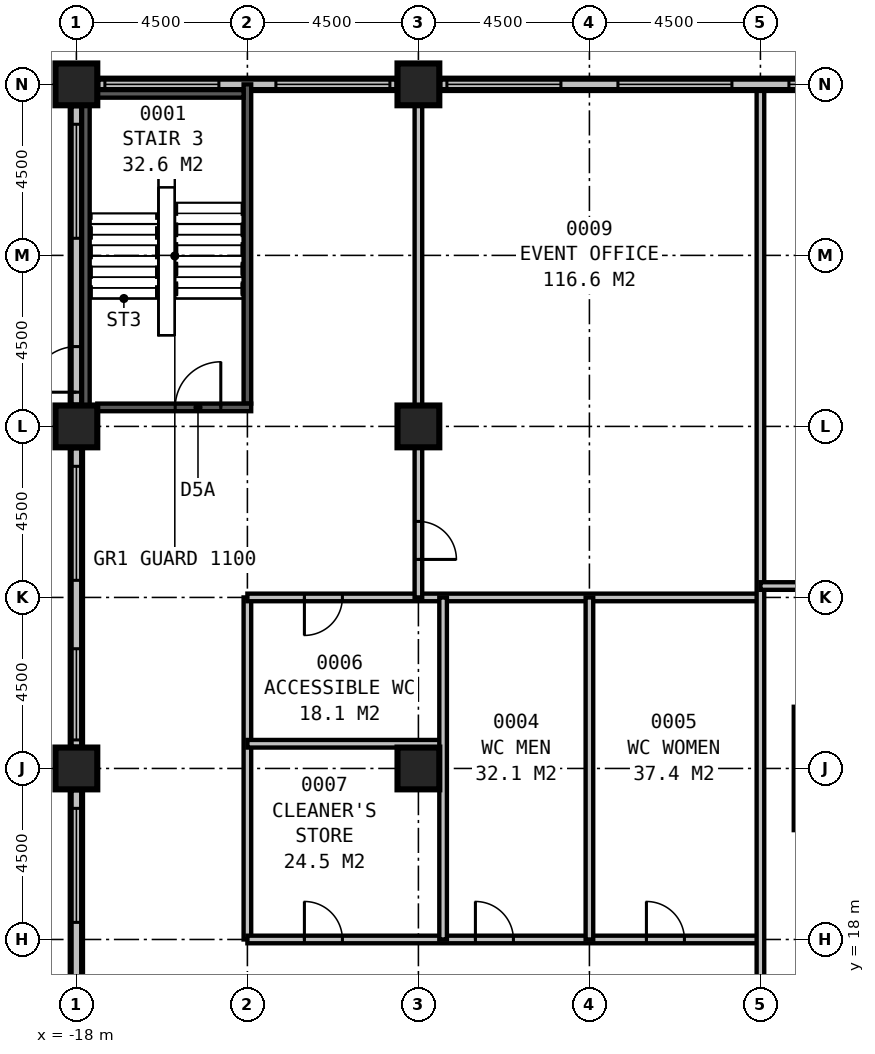
"""IFC4 building model, lengths in metres.
Left out: names, types, materials, properties, quantities, classifications, styles, units other than length and angle.
Written with IfcOpenShell. Run it as: python <this file> out.ifc"""

import sys

from ifc_helpers import new_model, si_unit, direction, frame, frame_2d, origin, origin_2d, place, context, subcontext, project, spatial, rectangle, extrude, element, fill, save


model = new_model("IFC4")
c1 = context("Model", 3, precision=1e-05, world=origin(), true_north=direction((0.0, 1.0)))
c2 = subcontext(c1, "Body", "Model", "MODEL_VIEW")
j1 = project(units=[si_unit("LENGTHUNIT", "METRE"), si_unit("PLANEANGLEUNIT", "RADIAN")], contexts=[c1])
p1 = place(None, origin())
s1 = spatial("IfcSite", under=j1, at=p1, CompositionType="ELEMENT")
p2 = place(p1, origin())
s2 = spatial("IfcBuilding", under=s1, at=p2, CompositionType="ELEMENT")
p3 = place(p2, origin())
s3 = spatial("IfcBuildingStorey", under=s2, at=p3, CompositionType="ELEMENT", Elevation=0.0)
for number, where, z_axis, x_axis in (
    (1, (-18.0, 22.5, 0.0), (0.0, 0.0, 1.0), (1.0, 0.0, 0.0)),
    (2, (-9.0, 22.5, 0.0), (0.0, 0.0, 1.0), (1.0, 0.0, 0.0)),
    (3, (-18.0, 31.5, 0.0), (0.0, 0.0, 1.0), (1.0, 0.0, 0.0)),
    (4, (-9.0, 31.5, 0.0), (0.0, 0.0, 1.0), (1.0, 0.0, 0.0)),
    (5, (-18.0, 40.5, 0.0), (0.0, 0.0, 1.0), (1.0, 0.0, 0.0)),
    (6, (-9.0, 40.5, 0.0), (0.0, 0.0, 1.0), (1.0, 0.0, 0.0)),
):
    element("IfcColumn", number, at=place(p3, frame(where, z_axis=z_axis, x_axis=x_axis)), inside=s3, PredefinedType="COLUMN", context=c2, shape_type="SweptSolid", body=[
        extrude(rectangle(XDim=1.1, YDim=1.1, at=origin_2d()), origin(), (0.0, 0.0, 1.0), 6.0),
    ])
p4 = place(p3, frame((3.95, 40.5, 0.0), z_axis=(0.0, 0.0, 1.0), x_axis=(-1.0, 0.0, 0.0)))
e7 = element("IfcWall", 7, at=p4, inside=s3, PredefinedType="STANDARD", context=c2, shape_type="SweptSolid", body=[
    extrude(rectangle(XDim=12.4, YDim=0.3, at=frame_2d((6.2, 0.0))), origin(), (0.0, 0.0, 1.0), 4.0),
])
p5 = place(p4, frame((0.2, 0.0, 0.5)))
e8 = element("IfcOpeningElement", 8, at=p5, cuts=e7, PredefinedType="OPENING", context=c2, shape_type="SweptSolid", body=[
    extrude(rectangle(XDim=3.0, YDim=3.0, at=frame_2d((1.5, 1.5))), frame((0.0, 0.16, 0.0), z_axis=(0.0, -1.0, 0.0), x_axis=(1.0, 0.0, 0.0)), (0.0, 0.0, 1.0), 0.32),
])
p6 = place(p4, frame((4.7, 0.0, 0.5)))
e9 = element("IfcOpeningElement", 9, at=p6, cuts=e7, PredefinedType="OPENING", context=c2, shape_type="SweptSolid", body=[
    extrude(rectangle(XDim=3.0, YDim=3.0, at=frame_2d((1.5, 1.5))), frame((0.0, 0.16, 0.0), z_axis=(0.0, -1.0, 0.0), x_axis=(1.0, 0.0, 0.0)), (0.0, 0.0, 1.0), 0.32),
])
p7 = place(p4, frame((9.2, 0.0, 0.5)))
e10 = element("IfcOpeningElement", 10, at=p7, cuts=e7, PredefinedType="OPENING", context=c2, shape_type="SweptSolid", body=[
    extrude(rectangle(XDim=3.0, YDim=3.0, at=frame_2d((1.5, 1.5))), frame((0.0, 0.16, 0.0), z_axis=(0.0, -1.0, 0.0), x_axis=(1.0, 0.0, 0.0)), (0.0, 0.0, 1.0), 0.32),
])
p8 = place(p3, frame((-9.55, 40.5, 0.0), z_axis=(0.0, 0.0, 1.0), x_axis=(-1.0, 0.0, 0.0)))
e11 = element("IfcWall", 11, at=p8, inside=s3, PredefinedType="STANDARD", context=c2, shape_type="SweptSolid", body=[
    extrude(rectangle(XDim=7.9, YDim=0.3, at=frame_2d((3.95, 0.0))), origin(), (0.0, 0.0, 1.0), 4.8),
])
p9 = place(p8, frame((0.2, 0.0, 0.5)))
e12 = element("IfcOpeningElement", 12, at=p9, cuts=e11, PredefinedType="OPENING", context=c2, shape_type="SweptSolid", body=[
    extrude(rectangle(XDim=3.0, YDim=3.0, at=frame_2d((1.5, 1.5))), frame((0.0, 0.16, 0.0), z_axis=(0.0, -1.0, 0.0), x_axis=(1.0, 0.0, 0.0)), (0.0, 0.0, 1.0), 0.32),
])
p10 = place(p8, frame((4.7, 0.0, 0.5)))
e13 = element("IfcOpeningElement", 13, at=p10, cuts=e11, PredefinedType="OPENING", context=c2, shape_type="SweptSolid", body=[
    extrude(rectangle(XDim=3.0, YDim=3.0, at=frame_2d((1.5, 1.5))), frame((0.0, 0.16, 0.0), z_axis=(0.0, -1.0, 0.0), x_axis=(1.0, 0.0, 0.0)), (0.0, 0.0, 1.0), 0.32),
])
p11 = place(p3, frame((-18.0, 39.95, 0.0), z_axis=(0.0, 0.0, 1.0), x_axis=(0.0, -1.0, 0.0)))
e14 = element("IfcWall", 14, at=p11, inside=s3, PredefinedType="STANDARD", context=c2, shape_type="SweptSolid", body=[
    extrude(rectangle(XDim=7.9, YDim=0.3, at=frame_2d((3.95, 0.0))), origin(), (0.0, 0.0, 1.0), 4.8),
])
p12 = place(p11, frame((7.55, 0.0, 0.0), z_axis=(0.0, 0.0, 1.0), x_axis=(-1.0, 0.0, 0.0)))
e15 = element("IfcOpeningElement", 15, at=p12, cuts=e14, PredefinedType="OPENING", context=c2, shape_type="SweptSolid", body=[
    extrude(rectangle(XDim=1.2, YDim=2.4, at=frame_2d((0.6, 1.2))), frame((0.0, 0.16, 0.0), z_axis=(0.0, -1.0, 0.0), x_axis=(1.0, 0.0, 0.0)), (0.0, 0.0, 1.0), 0.32),
])
p13 = place(p11, frame((0.5, 0.0, 0.5)))
e16 = element("IfcOpeningElement", 16, at=p13, cuts=e14, PredefinedType="OPENING", context=c2, shape_type="SweptSolid", body=[
    extrude(rectangle(XDim=3.0, YDim=3.0, at=frame_2d((1.5, 1.5))), frame((0.0, 0.16, 0.0), z_axis=(0.0, -1.0, 0.0), x_axis=(1.0, 0.0, 0.0)), (0.0, 0.0, 1.0), 0.32),
])
p14 = place(p3, frame((-18.0, 30.95, 0.0), z_axis=(0.0, 0.0, 1.0), x_axis=(0.0, -1.0, 0.0)))
e17 = element("IfcWall", 17, at=p14, inside=s3, PredefinedType="STANDARD", context=c2, shape_type="SweptSolid", body=[
    extrude(rectangle(XDim=7.9, YDim=0.3, at=frame_2d((3.95, 0.0))), origin(), (0.0, 0.0, 1.0), 4.1),
])
p15 = place(p14, frame((0.5, 0.0, 0.5)))
e18 = element("IfcOpeningElement", 18, at=p15, cuts=e17, PredefinedType="OPENING", context=c2, shape_type="SweptSolid", body=[
    extrude(rectangle(XDim=3.0, YDim=3.0, at=frame_2d((1.5, 1.5))), frame((0.0, 0.16, 0.0), z_axis=(0.0, -1.0, 0.0), x_axis=(1.0, 0.0, 0.0)), (0.0, 0.0, 1.0), 0.32),
])
p16 = place(p14, frame((5.3, 0.0, 0.5)))
e19 = element("IfcOpeningElement", 19, at=p16, cuts=e17, PredefinedType="OPENING", context=c2, shape_type="SweptSolid", body=[
    extrude(rectangle(XDim=2.4, YDim=3.0, at=frame_2d((1.2, 1.5))), frame((0.0, 0.16, 0.0), z_axis=(0.0, -1.0, 0.0), x_axis=(1.0, 0.0, 0.0)), (0.0, 0.0, 1.0), 0.32),
])
p17 = place(p3, frame((-18.0, 21.95, 0.0), z_axis=(0.0, 0.0, 1.0), x_axis=(0.0, -1.0, 0.0)))
e20 = element("IfcWall", 20, at=p17, inside=s3, PredefinedType="STANDARD", context=c2, shape_type="SweptSolid", body=[
    extrude(rectangle(XDim=7.9, YDim=0.3, at=frame_2d((3.95, 0.0))), origin(), (0.0, 0.0, 1.0), 4.1),
])
p18 = place(p17, frame((0.5, 0.0, 0.5)))
e21 = element("IfcOpeningElement", 21, at=p18, cuts=e20, PredefinedType="OPENING", context=c2, shape_type="SweptSolid", body=[
    extrude(rectangle(XDim=3.0, YDim=3.0, at=frame_2d((1.5, 1.5))), frame((0.0, 0.16, 0.0), z_axis=(0.0, -1.0, 0.0), x_axis=(1.0, 0.0, 0.0)), (0.0, 0.0, 1.0), 0.32),
])
p19 = place(p17, frame((5.3, 0.0, 0.5)))
e22 = element("IfcOpeningElement", 22, at=p19, cuts=e20, PredefinedType="OPENING", context=c2, shape_type="SweptSolid", body=[
    extrude(rectangle(XDim=2.4, YDim=3.0, at=frame_2d((1.2, 1.5))), frame((0.0, 0.16, 0.0), z_axis=(0.0, -1.0, 0.0), x_axis=(1.0, 0.0, 0.0)), (0.0, 0.0, 1.0), 0.32),
])
p20 = place(p3, frame((-17.45, 32.0, 0.0), z_axis=(0.0, 0.0, 1.0), x_axis=(1.0, 0.0, 0.0)))
e23 = element("IfcWall", 23, at=p20, inside=s3, PredefinedType="SOLIDWALL", context=c2, shape_type="SweptSolid", body=[
    extrude(rectangle(XDim=4.05, YDim=0.2, at=frame_2d((2.025, 0.0))), origin(), (0.0, 0.0, 1.0), 4.1),
])
p21 = place(p20, frame((2.05, 0.0, 0.0)))
e24 = element("IfcOpeningElement", 24, at=p21, cuts=e23, PredefinedType="OPENING", context=c2, shape_type="SweptSolid", body=[
    extrude(rectangle(XDim=1.2, YDim=2.1, at=frame_2d((0.6, 1.05))), frame((0.0, 0.11, 0.0), z_axis=(0.0, -1.0, 0.0), x_axis=(1.0, 0.0, 0.0)), (0.0, 0.0, 1.0), 0.22),
])
p22 = place(p3, frame((-13.5, 32.1, 0.0), z_axis=(0.0, 0.0, 1.0), x_axis=(0.0, 1.0, 0.0)))
e25 = element("IfcWall", 25, at=p22, inside=s3, PredefinedType="SOLIDWALL", context=c2, shape_type="SweptSolid", body=[
    extrude(rectangle(XDim=8.4, YDim=0.2, at=frame_2d((4.2, 0.0))), origin(), (0.0, 0.0, 1.0), 5.7),
])
p23 = place(p3, frame((-17.75, 32.05, 0.0), z_axis=(0.0, 0.0, 1.0), x_axis=(0.0, 1.0, 0.0)))
e26 = element("IfcWall", 26, at=p23, inside=s3, PredefinedType="SOLIDWALL", context=c2, shape_type="SweptSolid", body=[
    extrude(rectangle(XDim=7.9, YDim=0.2, at=frame_2d((3.95, 0.0))), origin(), (0.0, 0.0, 1.0), 5.7),
])
p24 = place(p23, frame((0.35, 0.0, 0.0)))
e27 = element("IfcOpeningElement", 27, at=p24, cuts=e26, PredefinedType="OPENING", context=c2, shape_type="SweptSolid", body=[
    extrude(rectangle(XDim=1.2, YDim=2.4, at=frame_2d((0.6, 1.2))), frame((0.0, 0.11, 0.0), z_axis=(0.0, -1.0, 0.0), x_axis=(1.0, 0.0, 0.0)), (0.0, 0.0, 1.0), 0.22),
])
p25 = place(p23, frame((4.4, 0.0, 0.5)))
e28 = element("IfcOpeningElement", 28, at=p25, cuts=e26, PredefinedType="OPENING", context=c2, shape_type="SweptSolid", body=[
    extrude(rectangle(XDim=3.0, YDim=3.0, at=frame_2d((1.5, 1.5))), frame((0.0, 0.11, 0.0), z_axis=(0.0, -1.0, 0.0), x_axis=(1.0, 0.0, 0.0)), (0.0, 0.0, 1.0), 0.22),
])
p26 = place(p3, frame((-17.45, 40.25, 0.0), z_axis=(0.0, 0.0, 1.0), x_axis=(1.0, 0.0, 0.0)))
e29 = element("IfcWall", 29, at=p26, inside=s3, PredefinedType="SOLIDWALL", context=c2, shape_type="SweptSolid", body=[
    extrude(rectangle(XDim=3.85, YDim=0.2, at=frame_2d((1.925, 0.0))), origin(), (0.0, 0.0, 1.0), 5.7),
])
p27 = place(p26, frame((0.2, 0.0, 0.5)))
e30 = element("IfcOpeningElement", 30, at=p27, cuts=e29, PredefinedType="OPENING", context=c2, shape_type="SweptSolid", body=[
    extrude(rectangle(XDim=3.0, YDim=3.0, at=frame_2d((1.5, 1.5))), frame((0.0, 0.11, 0.0), z_axis=(0.0, -1.0, 0.0), x_axis=(1.0, 0.0, 0.0)), (0.0, 0.0, 1.0), 0.22),
])
p28 = place(p3, frame((0.0, 10.4, 0.0), z_axis=(0.0, 0.0, 1.0), x_axis=(0.0, 1.0, 0.0)))
e31 = element("IfcWall", 31, at=p28, inside=s3, PredefinedType="PARTITIONING", context=c2, shape_type="SweptSolid", body=[
    extrude(rectangle(XDim=30.1, YDim=0.2, at=frame_2d((15.05, 0.0))), origin(), (0.0, 0.0, 1.0), 5.7),
])
p29 = place(p28, frame((0.2, 0.0, 0.0)))
e32 = element("IfcOpeningElement", 32, at=p29, cuts=e31, PredefinedType="OPENING", context=c2, shape_type="SweptSolid", body=[
    extrude(rectangle(XDim=1.2, YDim=2.1, at=frame_2d((0.6, 1.05))), frame((0.0, 0.11, 0.0), z_axis=(0.0, -1.0, 0.0), x_axis=(1.0, 0.0, 0.0)), (0.0, 0.0, 1.0), 0.22),
])
p30 = place(p3, frame((-13.5, 18.0, 0.0), z_axis=(0.0, 0.0, 1.0), x_axis=(1.0, 0.0, 0.0)))
e33 = element("IfcWall", 33, at=p30, inside=s3, PredefinedType="PARTITIONING", context=c2, shape_type="SweptSolid", body=[
    extrude(rectangle(XDim=13.5, YDim=0.2, at=frame_2d((6.75, 0.0))), origin(), (0.0, 0.0, 1.0), 5.7),
])
p31 = place(p30, frame((6.0, 0.0, 0.0)))
e34 = element("IfcOpeningElement", 34, at=p31, cuts=e33, PredefinedType="OPENING", context=c2, shape_type="SweptSolid", body=[
    extrude(rectangle(XDim=1.0, YDim=2.1, at=frame_2d((0.5, 1.05))), frame((0.0, 0.11, 0.0), z_axis=(0.0, -1.0, 0.0), x_axis=(1.0, 0.0, 0.0)), (0.0, 0.0, 1.0), 0.22),
])
p32 = place(p30, frame((10.5, 0.0, 0.0)))
e35 = element("IfcOpeningElement", 35, at=p32, cuts=e33, PredefinedType="OPENING", context=c2, shape_type="SweptSolid", body=[
    extrude(rectangle(XDim=1.0, YDim=2.1, at=frame_2d((0.5, 1.05))), frame((0.0, 0.11, 0.0), z_axis=(0.0, -1.0, 0.0), x_axis=(1.0, 0.0, 0.0)), (0.0, 0.0, 1.0), 0.22),
])
p33 = place(p30, frame((1.5, 0.0, 0.0)))
e36 = element("IfcOpeningElement", 36, at=p33, cuts=e33, PredefinedType="OPENING", context=c2, shape_type="SweptSolid", body=[
    extrude(rectangle(XDim=1.0, YDim=2.1, at=frame_2d((0.5, 1.05))), frame((0.0, 0.11, 0.0), z_axis=(0.0, -1.0, 0.0), x_axis=(1.0, 0.0, 0.0)), (0.0, 0.0, 1.0), 0.22),
])
p34 = place(p3, frame((-13.5, 18.0, 0.0), z_axis=(0.0, 0.0, 1.0), x_axis=(0.0, 1.0, 0.0)))
e37 = element("IfcWall", 37, at=p34, inside=s3, PredefinedType="PARTITIONING", context=c2, shape_type="SweptSolid", body=[
    extrude(rectangle(XDim=9.0, YDim=0.2, at=frame_2d((4.5, 0.0))), origin(), (0.0, 0.0, 1.0), 5.7),
])
p35 = place(p3, frame((-13.5, 27.0, 0.0), z_axis=(0.0, 0.0, 1.0), x_axis=(1.0, 0.0, 0.0)))
e38 = element("IfcWall", 38, at=p35, inside=s3, PredefinedType="PARTITIONING", context=c2, shape_type="SweptSolid", body=[
    extrude(rectangle(XDim=13.5, YDim=0.2, at=frame_2d((6.75, 0.0))), origin(), (0.0, 0.0, 1.0), 5.7),
])
p36 = place(p35, frame((2.5, 0.0, 0.0), z_axis=(0.0, 0.0, 1.0), x_axis=(-1.0, 0.0, 0.0)))
e39 = element("IfcOpeningElement", 39, at=p36, cuts=e38, PredefinedType="OPENING", context=c2, shape_type="SweptSolid", body=[
    extrude(rectangle(XDim=1.0, YDim=2.1, at=frame_2d((0.5, 1.05))), frame((0.0, 0.11, 0.0), z_axis=(0.0, -1.0, 0.0), x_axis=(1.0, 0.0, 0.0)), (0.0, 0.0, 1.0), 0.22),
])
p37 = place(p3, frame((-4.5, 18.0, 0.0), z_axis=(0.0, 0.0, 1.0), x_axis=(0.0, 1.0, 0.0)))
e40 = element("IfcWall", 40, at=p37, inside=s3, PredefinedType="PARTITIONING", context=c2, shape_type="SweptSolid", body=[
    extrude(rectangle(XDim=9.0, YDim=0.2, at=frame_2d((4.5, 0.0))), origin(), (0.0, 0.0, 1.0), 5.7),
])
p38 = place(p3, frame((-13.5, 23.15, 0.0), z_axis=(0.0, 0.0, 1.0), x_axis=(1.0, 0.0, 0.0)))
e41 = element("IfcWall", 41, at=p38, inside=s3, PredefinedType="PARTITIONING", context=c2, shape_type="SweptSolid", body=[
    extrude(rectangle(XDim=5.15, YDim=0.2, at=frame_2d((2.575, 0.0))), origin(), (0.0, 0.0, 1.0), 5.7),
])
p39 = place(p3, frame((-8.35, 18.0, 0.0), z_axis=(0.0, 0.0, 1.0), x_axis=(0.0, 1.0, 0.0)))
e42 = element("IfcWall", 42, at=p39, inside=s3, PredefinedType="PARTITIONING", context=c2, shape_type="SweptSolid", body=[
    extrude(rectangle(XDim=9.0, YDim=0.2, at=frame_2d((4.5, 0.0))), origin(), (0.0, 0.0, 1.0), 5.7),
])
p40 = place(p3, frame((-9.0, 27.0, 0.0), z_axis=(0.0, 0.0, 1.0), x_axis=(0.0, 1.0, 0.0)))
e43 = element("IfcWall", 43, at=p40, inside=s3, PredefinedType="PARTITIONING", context=c2, shape_type="SweptSolid", body=[
    extrude(rectangle(XDim=3.95, YDim=0.2, at=frame_2d((1.975, 0.0))), origin(), (0.0, 0.0, 1.0), 4.1),
])
p41 = place(p40, frame((2.0, 0.0, 0.0), z_axis=(0.0, 0.0, 1.0), x_axis=(-1.0, 0.0, 0.0)))
e44 = element("IfcOpeningElement", 44, at=p41, cuts=e43, PredefinedType="OPENING", context=c2, shape_type="SweptSolid", body=[
    extrude(rectangle(XDim=1.0, YDim=2.1, at=frame_2d((0.5, 1.05))), frame((0.0, 0.11, 0.0), z_axis=(0.0, -1.0, 0.0), x_axis=(1.0, 0.0, 0.0)), (0.0, 0.0, 1.0), 0.22),
])
p42 = place(p3, frame((-9.0, 32.05, 0.0), z_axis=(0.0, 0.0, 1.0), x_axis=(0.0, 1.0, 0.0)))
e45 = element("IfcWall", 45, at=p42, inside=s3, PredefinedType="PARTITIONING", context=c2, shape_type="SweptSolid", body=[
    extrude(rectangle(XDim=7.9, YDim=0.2, at=frame_2d((3.95, 0.0))), origin(), (0.0, 0.0, 1.0), 4.1),
])
p43 = place(p3, frame((0.0, 27.3, 0.0), z_axis=(0.0, 0.0, 1.0), x_axis=(1.0, 0.0, 0.0)))
e46 = element("IfcWall", 46, at=p43, inside=s3, PredefinedType="PARTITIONING", context=c2, shape_type="SweptSolid", body=[
    extrude(rectangle(XDim=1.7, YDim=0.2, at=frame_2d((0.85, 0.0))), origin(), (0.0, 0.0, 1.0), 5.7),
])
p44 = place(p5, origin())
e47 = element("IfcWindow", 47, at=p44, inside=s3, PartitioningType="SINGLE_PANEL", PredefinedType="WINDOW", context=c2, shape_type="SweptSolid", body=[
    extrude(rectangle(XDim=3.0, YDim=3.0, at=frame_2d((1.5, 1.5))), frame((0.0, 0.03, 0.0), z_axis=(0.0, -1.0, 0.0), x_axis=(1.0, 0.0, 0.0)), (0.0, 0.0, 1.0), 0.06),
])
fill(e8, e47)
p45 = place(p6, origin())
e48 = element("IfcWindow", 48, at=p45, inside=s3, PartitioningType="SINGLE_PANEL", PredefinedType="WINDOW", context=c2, shape_type="SweptSolid", body=[
    extrude(rectangle(XDim=3.0, YDim=3.0, at=frame_2d((1.5, 1.5))), frame((0.0, 0.03, 0.0), z_axis=(0.0, -1.0, 0.0), x_axis=(1.0, 0.0, 0.0)), (0.0, 0.0, 1.0), 0.06),
])
fill(e9, e48)
p46 = place(p7, origin())
e49 = element("IfcWindow", 49, at=p46, inside=s3, PartitioningType="SINGLE_PANEL", PredefinedType="WINDOW", context=c2, shape_type="SweptSolid", body=[
    extrude(rectangle(XDim=3.0, YDim=3.0, at=frame_2d((1.5, 1.5))), frame((0.0, 0.03, 0.0), z_axis=(0.0, -1.0, 0.0), x_axis=(1.0, 0.0, 0.0)), (0.0, 0.0, 1.0), 0.06),
])
fill(e10, e49)
p47 = place(p9, origin())
e50 = element("IfcWindow", 50, at=p47, inside=s3, PartitioningType="SINGLE_PANEL", PredefinedType="WINDOW", context=c2, shape_type="SweptSolid", body=[
    extrude(rectangle(XDim=3.0, YDim=3.0, at=frame_2d((1.5, 1.5))), frame((0.0, 0.03, 0.0), z_axis=(0.0, -1.0, 0.0), x_axis=(1.0, 0.0, 0.0)), (0.0, 0.0, 1.0), 0.06),
])
fill(e12, e50)
p48 = place(p10, origin())
e51 = element("IfcWindow", 51, at=p48, inside=s3, PartitioningType="SINGLE_PANEL", PredefinedType="WINDOW", context=c2, shape_type="SweptSolid", body=[
    extrude(rectangle(XDim=3.0, YDim=3.0, at=frame_2d((1.5, 1.5))), frame((0.0, 0.03, 0.0), z_axis=(0.0, -1.0, 0.0), x_axis=(1.0, 0.0, 0.0)), (0.0, 0.0, 1.0), 0.06),
])
fill(e13, e51)
p49 = place(p12, origin())
e52 = element("IfcDoor", 52, at=p49, inside=s3, OperationType="SINGLE_SWING_LEFT", PredefinedType="DOOR", context=c2, shape_type="SweptSolid", body=[
    extrude(rectangle(XDim=1.2, YDim=2.4, at=frame_2d((0.6, 1.2))), frame((0.0, 0.025, 0.0), z_axis=(0.0, -1.0, 0.0), x_axis=(1.0, 0.0, 0.0)), (0.0, 0.0, 1.0), 0.05),
])
fill(e15, e52)
p50 = place(p13, origin())
e53 = element("IfcWindow", 53, at=p50, inside=s3, PartitioningType="SINGLE_PANEL", PredefinedType="WINDOW", context=c2, shape_type="SweptSolid", body=[
    extrude(rectangle(XDim=3.0, YDim=3.0, at=frame_2d((1.5, 1.5))), frame((0.0, 0.03, 0.0), z_axis=(0.0, -1.0, 0.0), x_axis=(1.0, 0.0, 0.0)), (0.0, 0.0, 1.0), 0.06),
])
fill(e16, e53)
p51 = place(p15, origin())
e54 = element("IfcWindow", 54, at=p51, inside=s3, PartitioningType="SINGLE_PANEL", PredefinedType="WINDOW", context=c2, shape_type="SweptSolid", body=[
    extrude(rectangle(XDim=3.0, YDim=3.0, at=frame_2d((1.5, 1.5))), frame((0.0, 0.03, 0.0), z_axis=(0.0, -1.0, 0.0), x_axis=(1.0, 0.0, 0.0)), (0.0, 0.0, 1.0), 0.06),
])
fill(e18, e54)
p52 = place(p16, origin())
e55 = element("IfcWindow", 55, at=p52, inside=s3, PartitioningType="SINGLE_PANEL", PredefinedType="WINDOW", context=c2, shape_type="SweptSolid", body=[
    extrude(rectangle(XDim=2.4, YDim=3.0, at=frame_2d((1.2, 1.5))), frame((0.0, 0.03, 0.0), z_axis=(0.0, -1.0, 0.0), x_axis=(1.0, 0.0, 0.0)), (0.0, 0.0, 1.0), 0.06),
])
fill(e19, e55)
p53 = place(p18, origin())
e56 = element("IfcWindow", 56, at=p53, inside=s3, PartitioningType="SINGLE_PANEL", PredefinedType="WINDOW", context=c2, shape_type="SweptSolid", body=[
    extrude(rectangle(XDim=3.0, YDim=3.0, at=frame_2d((1.5, 1.5))), frame((0.0, 0.03, 0.0), z_axis=(0.0, -1.0, 0.0), x_axis=(1.0, 0.0, 0.0)), (0.0, 0.0, 1.0), 0.06),
])
fill(e21, e56)
p54 = place(p21, origin())
e57 = element("IfcDoor", 57, at=p54, inside=s3, OperationType="SINGLE_SWING_RIGHT", PredefinedType="DOOR", context=c2, shape_type="SweptSolid", body=[
    extrude(rectangle(XDim=1.2, YDim=2.1, at=frame_2d((0.6, 1.05))), frame((0.0, 0.025, 0.0), z_axis=(0.0, -1.0, 0.0), x_axis=(1.0, 0.0, 0.0)), (0.0, 0.0, 1.0), 0.05),
])
fill(e24, e57)
p55 = place(p31, origin())
e58 = element("IfcDoor", 58, at=p55, inside=s3, OperationType="SINGLE_SWING_LEFT", PredefinedType="DOOR", context=c2, shape_type="SweptSolid", body=[
    extrude(rectangle(XDim=1.0, YDim=2.1, at=frame_2d((0.5, 1.05))), frame((0.0, 0.025, 0.0), z_axis=(0.0, -1.0, 0.0), x_axis=(1.0, 0.0, 0.0)), (0.0, 0.0, 1.0), 0.05),
])
fill(e34, e58)
p56 = place(p32, origin())
e59 = element("IfcDoor", 59, at=p56, inside=s3, OperationType="SINGLE_SWING_LEFT", PredefinedType="DOOR", context=c2, shape_type="SweptSolid", body=[
    extrude(rectangle(XDim=1.0, YDim=2.1, at=frame_2d((0.5, 1.05))), frame((0.0, 0.025, 0.0), z_axis=(0.0, -1.0, 0.0), x_axis=(1.0, 0.0, 0.0)), (0.0, 0.0, 1.0), 0.05),
])
fill(e35, e59)
p57 = place(p33, origin())
e60 = element("IfcDoor", 60, at=p57, inside=s3, OperationType="SINGLE_SWING_LEFT", PredefinedType="DOOR", context=c2, shape_type="SweptSolid", body=[
    extrude(rectangle(XDim=1.0, YDim=2.1, at=frame_2d((0.5, 1.05))), frame((0.0, 0.025, 0.0), z_axis=(0.0, -1.0, 0.0), x_axis=(1.0, 0.0, 0.0)), (0.0, 0.0, 1.0), 0.05),
])
fill(e36, e60)
p58 = place(p36, origin())
e61 = element("IfcDoor", 61, at=p58, inside=s3, OperationType="SINGLE_SWING_RIGHT", PredefinedType="DOOR", context=c2, shape_type="SweptSolid", body=[
    extrude(rectangle(XDim=1.0, YDim=2.1, at=frame_2d((0.5, 1.05))), frame((0.0, 0.025, 0.0), z_axis=(0.0, -1.0, 0.0), x_axis=(1.0, 0.0, 0.0)), (0.0, 0.0, 1.0), 0.05),
])
fill(e39, e61)
p59 = place(p41, origin())
e62 = element("IfcDoor", 62, at=p59, inside=s3, OperationType="SINGLE_SWING_RIGHT", PredefinedType="DOOR", context=c2, shape_type="SweptSolid", body=[
    extrude(rectangle(XDim=1.0, YDim=2.1, at=frame_2d((0.5, 1.05))), frame((0.0, 0.025, 0.0), z_axis=(0.0, -1.0, 0.0), x_axis=(1.0, 0.0, 0.0)), (0.0, 0.0, 1.0), 0.05),
])
fill(e44, e62)
save(model, sys.argv[1])
